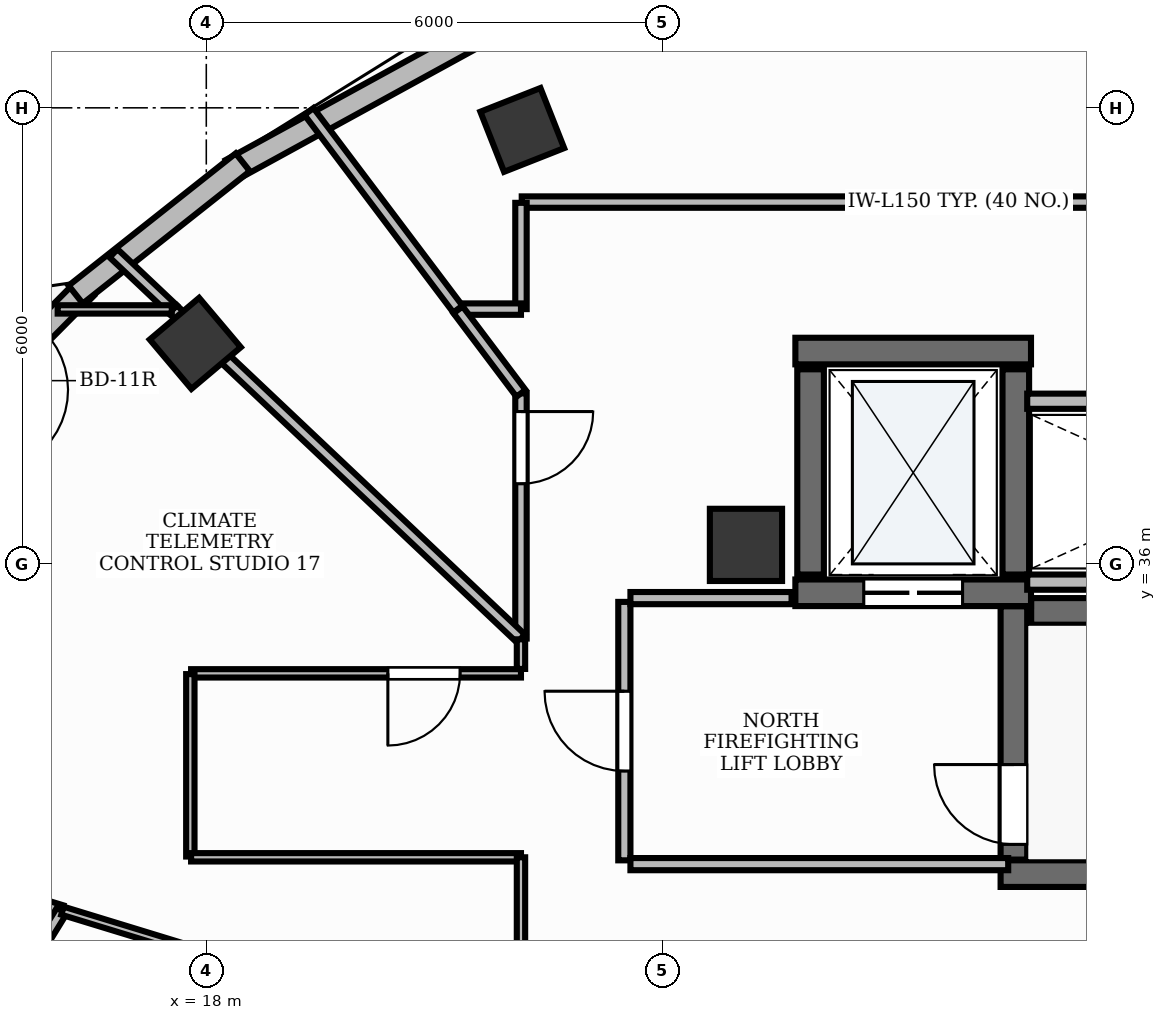
"""IFC4 building model, lengths in metres.
Left out: names, types, materials, properties, quantities, classifications, styles, units other than length and angle.
Written with IfcOpenShell. Run it as: python <this file> out.ifc"""

import sys

from ifc_helpers import new_model, si_unit, direction, frame, frame_2d, origin, origin_2d, place, context, subcontext, project, spatial, rectangle, extrude, element, fill, save


model = new_model("IFC4")
c1 = context("Model", 3, precision=1e-05, world=origin(), true_north=direction((0.0, 1.0)))
c2 = subcontext(c1, "Body", "Model", "MODEL_VIEW")
j1 = project(units=[si_unit("LENGTHUNIT", "METRE"), si_unit("PLANEANGLEUNIT", "RADIAN")], contexts=[c1])
p1 = place(None, origin())
s1 = spatial("IfcSite", under=j1, at=p1, CompositionType="ELEMENT")
p2 = place(p1, origin())
s2 = spatial("IfcBuilding", under=s1, at=p2, CompositionType="ELEMENT")
p3 = place(p2, frame((0.0, 0.0, 291.0)))
s3 = spatial("IfcBuildingStorey", under=s2, at=p3, CompositionType="ELEMENT", Elevation=291.0)
p4 = place(p3, frame((28.852, 35.375, 0.0), z_axis=(0.0, 0.0, 1.0), x_axis=(1.0, 0.0, 0.0)))
e1 = element("IfcWall", 1, at=p4, inside=s3, PredefinedType="SHEAR", context=c2, shape_type="SweptSolid", body=[
    extrude(rectangle(XDim=8.148, YDim=0.35, at=frame_2d((4.074, 0.0))), origin(), (0.0, 0.0, 1.0), 6.3),
])
p5 = place(p3, frame((28.45, 31.925, 0.0), z_axis=(0.0, 0.0, 1.0), x_axis=(1.0, 0.0, 0.0)))
e2 = element("IfcWall", 2, at=p5, inside=s3, PredefinedType="SHEAR", context=c2, shape_type="SweptSolid", body=[
    extrude(rectangle(XDim=8.55, YDim=0.35, at=frame_2d((4.275, 0.0))), origin(), (0.0, 0.0, 1.0), 6.3),
])
p6 = place(p3, frame((28.625, 32.11, 0.0), z_axis=(0.0, 0.0, 1.0), x_axis=(0.0, 1.0, 0.0)))
e3 = element("IfcWall", 3, at=p6, inside=s3, PredefinedType="SHEAR", context=c2, shape_type="SweptSolid", body=[
    extrude(rectangle(XDim=3.333, YDim=0.35, at=frame_2d((1.667, 0.0))), origin(), (0.0, 0.0, 1.0), 6.3),
])
p7 = place(p6, frame((0.2, 0.0, 0.0)))
e4 = element("IfcOpeningElement", 4, at=p7, cuts=e3, PredefinedType="OPENING", context=c2, shape_type="SweptSolid", body=[
    extrude(rectangle(XDim=1.05, YDim=2.15, at=frame_2d((0.525, 1.075))), frame((0.0, 0.19, 0.0), z_axis=(0.0, -1.0, 0.0), x_axis=(1.0, 0.0, 0.0)), (0.0, 0.0, 1.0), 0.38),
])
p8 = place(p3, frame((25.75, 38.8, 0.0), z_axis=(0.0, 0.0, 1.0), x_axis=(1.0, 0.0, 0.0)))
e5 = element("IfcWall", 5, at=p8, inside=s3, PredefinedType="SHEAR", context=c2, shape_type="SweptSolid", body=[
    extrude(rectangle(XDim=3.1, YDim=0.35, at=frame_2d((1.55, 0.0))), origin(), (0.0, 0.0, 1.0), 6.3),
])
p9 = place(p3, frame((25.75, 35.62, 0.0), z_axis=(0.0, 0.0, 1.0), x_axis=(1.0, 0.0, 0.0)))
e6 = element("IfcWall", 6, at=p9, inside=s3, PredefinedType="SHEAR", context=c2, shape_type="SweptSolid", body=[
    extrude(rectangle(XDim=3.1, YDim=0.35, at=frame_2d((1.55, 0.0))), origin(), (0.0, 0.0, 1.0), 6.3),
])
p10 = place(p9, frame((0.9, 0.0, 0.0)))
e7 = element("IfcOpeningElement", 7, at=p10, cuts=e6, PredefinedType="OPENING", context=c2, shape_type="SweptSolid", body=[
    extrude(rectangle(XDim=1.3, YDim=2.2, at=frame_2d((0.65, 1.1))), frame((0.0, 0.19, 0.0), z_axis=(0.0, -1.0, 0.0), x_axis=(1.0, 0.0, 0.0)), (0.0, 0.0, 1.0), 0.38),
])
for number, where, z_axis, x_axis in (
    (8, (25.95, 35.86, 0.0), (0.0, 0.0, 1.0), (0.0, 1.0, 0.0)),
    (9, (28.65, 35.86, 0.0), (0.0, 0.0, 1.0), (0.0, 1.0, 0.0)),
):
    element("IfcWall", number, at=place(p3, frame(where, z_axis=z_axis, x_axis=x_axis)), inside=s3, PredefinedType="SHEAR", context=c2, shape_type="SweptSolid", body=[
        extrude(rectangle(XDim=2.7, YDim=0.35, at=frame_2d((1.35, 0.0))), origin(), (0.0, 0.0, 1.0), 6.3),
    ])
p11 = place(p3, frame((25.1, 36.25, -0.0), z_axis=(0.0, 0.0, 1.0), x_axis=(1.0, 0.0, 0.0)))
e10 = element("IfcColumn", 10, at=p11, inside=s3, PredefinedType="PILASTER", context=c2, shape_type="SweptSolid", body=[
    extrude(rectangle(XDim=0.95, YDim=0.95, at=origin_2d()), origin(), (0.0, 0.0, 1.0), 6.301),
])
for number, where, z_axis, x_axis in (
    (11, (22.157, 41.709, -0.0), (0.0, 0.0, 1.0), (0.93, 0.367, 0.0)),
    (12, (17.855, 38.901, -0.0), (0.0, 0.0, 1.0), (0.764, 0.645, 0.0)),
):
    element("IfcColumn", number, at=place(p3, frame(where, z_axis=z_axis, x_axis=x_axis)), inside=s3, PredefinedType="COLUMN", context=c2, shape_type="SweptSolid", body=[
        extrude(rectangle(XDim=0.85, YDim=0.85, at=origin_2d()), origin(), (0.0, 0.0, 1.0), 6.301),
    ])
p12 = place(p3, frame((16.414, 39.633, 0.0), z_axis=(0.0, 0.0, 1.0), x_axis=(-0.703783131399, -0.710414881572, 0.0)))
e13 = element("IfcWall", 13, at=p12, inside=s3, PredefinedType="STANDARD", context=c2, shape_type="SweptSolid", body=[
    extrude(rectangle(XDim=2.688, YDim=0.3, at=frame_2d((1.344, 0.0))), origin(), (0.0, 0.0, 1.0), 6.3),
])
p13 = place(p12, frame((0.794, 0.0, 0.0)))
e14 = element("IfcOpeningElement", 14, at=p13, cuts=e13, PredefinedType="OPENING", context=c2, shape_type="SweptSolid", body=[
    extrude(rectangle(XDim=1.1, YDim=2.15, at=frame_2d((0.55, 1.075))), frame((0.0, 0.165, 0.0), z_axis=(0.0, -1.0, 0.0), x_axis=(1.0, 0.0, 0.0)), (0.0, 0.0, 1.0), 0.33),
])
p14 = place(p3, frame((23.286, 43.898, 0.0), z_axis=(0.0, 0.0, 1.0), x_axis=(-0.877062479499, -0.480376318166, 0.0)))
e15 = element("IfcWall", 15, at=p14, inside=s3, PredefinedType="STANDARD", context=c2, shape_type="SweptSolid", body=[
    extrude(rectangle(XDim=5.654, YDim=0.3, at=frame_2d((2.827, 0.0))), origin(), (0.0, 0.0, 1.0), 5.87),
])
p15 = place(p3, frame((18.48, 41.283, 0.0), z_axis=(0.0, 0.0, 1.0), x_axis=(-0.784028163495, -0.620725252303, 0.0)))
e16 = element("IfcWall", 16, at=p15, inside=s3, PredefinedType="STANDARD", context=c2, shape_type="SweptSolid", body=[
    extrude(rectangle(XDim=2.803, YDim=0.3, at=frame_2d((1.402, 0.0))), origin(), (0.0, 0.0, 1.0), 5.87),
])
for number, where, z_axis, x_axis in (
    (17, (28.8, 35.76, 0.0), (0.0, 0.0, 1.0), (1.0, 0.0, 0.0)),
    (18, (28.8, 38.14, 0.0), (0.0, 0.0, 1.0), (1.0, 0.0, 0.0)),
):
    element("IfcWall", number, at=place(p3, frame(where, z_axis=z_axis, x_axis=x_axis)), inside=s3, PredefinedType="PARTITIONING", context=c2, shape_type="SweptSolid", body=[
        extrude(rectangle(XDim=4.57, YDim=0.2, at=frame_2d((2.285, 0.0))), origin(), (0.0, 0.0, 1.0), 4.61),
    ])
p16 = place(p3, frame((23.5, 32.1, 0.0), z_axis=(0.0, 0.0, 1.0), x_axis=(0.0, 1.0, 0.0)))
e19 = element("IfcWall", 19, at=p16, inside=s3, PredefinedType="PARTITIONING", context=c2, shape_type="SweptSolid", body=[
    extrude(rectangle(XDim=3.4, YDim=0.16, at=frame_2d((1.7, 0.0))), origin(), (0.0, 0.0, 1.0), 4.61),
])
p17 = place(p16, frame((1.175, 0.0, 0.0)))
e20 = element("IfcOpeningElement", 20, at=p17, cuts=e19, PredefinedType="OPENING", context=c2, shape_type="SweptSolid", body=[
    extrude(rectangle(XDim=1.05, YDim=2.15, at=frame_2d((0.525, 1.075))), frame((0.0, 0.095, 0.0), z_axis=(0.0, -1.0, 0.0), x_axis=(1.0, 0.0, 0.0)), (0.0, 0.0, 1.0), 0.19),
])
p18 = place(p3, frame((23.58, 32.05, 0.0), z_axis=(0.0, 0.0, 1.0), x_axis=(1.0, 0.0, 0.0)))
e21 = element("IfcWall", 21, at=p18, inside=s3, PredefinedType="PARTITIONING", context=c2, shape_type="SweptSolid", body=[
    extrude(rectangle(XDim=4.97, YDim=0.16, at=frame_2d((2.485, 0.0))), origin(), (0.0, 0.0, 1.0), 4.61),
])
p19 = place(p3, frame((23.58, 35.55, 0.0), z_axis=(0.0, 0.0, 1.0), x_axis=(1.0, 0.0, 0.0)))
e22 = element("IfcWall", 22, at=p19, inside=s3, PredefinedType="PARTITIONING", context=c2, shape_type="SweptSolid", body=[
    extrude(rectangle(XDim=2.12, YDim=0.16, at=frame_2d((1.06, 0.0))), origin(), (0.0, 0.0, 1.0), 4.61),
])
p20 = place(p3, frame((35.058, 40.76, 0.0), z_axis=(0.0, 0.0, 1.0), x_axis=(-1.0, 0.0, 0.0)))
e23 = element("IfcWall", 23, at=p20, inside=s3, PredefinedType="PARTITIONING", context=c2, shape_type="SweptSolid", body=[
    extrude(rectangle(XDim=12.908, YDim=0.15, at=frame_2d((6.454, 0.0))), origin(), (0.0, 0.0, 1.0), 4.61),
])
p21 = place(p20, frame((0.24, 0.0, 0.0)))
e24 = element("IfcOpeningElement", 24, at=p21, cuts=e23, PredefinedType="OPENING", context=c2, shape_type="SweptSolid", body=[
    extrude(rectangle(XDim=0.95, YDim=2.15, at=frame_2d((0.475, 1.075))), frame((0.0, 0.09, 0.0), z_axis=(0.0, -1.0, 0.0), x_axis=(1.0, 0.0, 0.0)), (0.0, 0.0, 1.0), 0.18),
])
p22 = place(p3, frame((22.14, 38.244, 0.0), z_axis=(0.0, 0.0, 1.0), x_axis=(0.0, -1.0, 0.0)))
e25 = element("IfcWall", 25, at=p22, inside=s3, PredefinedType="PARTITIONING", context=c2, shape_type="SweptSolid", body=[
    extrude(rectangle(XDim=3.226, YDim=0.15, at=frame_2d((1.613, 0.0))), origin(), (0.0, 0.0, 1.0), 4.61),
])
p23 = place(p22, frame((0.24, 0.0, 0.0)))
e26 = element("IfcOpeningElement", 26, at=p23, cuts=e25, PredefinedType="OPENING", context=c2, shape_type="SweptSolid", body=[
    extrude(rectangle(XDim=0.95, YDim=2.15, at=frame_2d((0.475, 1.075))), frame((0.0, 0.09, 0.0), z_axis=(0.0, -1.0, 0.0), x_axis=(1.0, 0.0, 0.0)), (0.0, 0.0, 1.0), 0.18),
])
p24 = place(p3, frame((22.14, 34.56, 0.0), z_axis=(0.0, 0.0, 1.0), x_axis=(-1.0, 0.0, 0.0)))
e27 = element("IfcWall", 27, at=p24, inside=s3, PredefinedType="MOVABLE", context=c2, shape_type="SweptSolid", body=[
    extrude(rectangle(XDim=4.34, YDim=0.11, at=frame_2d((2.17, 0.0))), origin(), (0.0, 0.0, 1.0), 4.61),
])
p25 = place(p24, frame((0.801, 0.0, 0.0)))
e28 = element("IfcOpeningElement", 28, at=p25, cuts=e27, PredefinedType="OPENING", context=c2, shape_type="SweptSolid", body=[
    extrude(rectangle(XDim=0.95, YDim=2.15, at=frame_2d((0.475, 1.075))), frame((0.0, 0.07, 0.0), z_axis=(0.0, -1.0, 0.0), x_axis=(1.0, 0.0, 0.0)), (0.0, 0.0, 1.0), 0.14),
])
p26 = place(p3, frame((11.395, 32.874, 0.0), z_axis=(0.0, 0.0, 1.0), x_axis=(0.956304539226, -0.292372413638, 0.0)))
e29 = element("IfcWall", 29, at=p26, inside=s3, PredefinedType="PARTITIONING", context=c2, shape_type="SweptSolid", body=[
    extrude(rectangle(XDim=4.917, YDim=0.15, at=frame_2d((2.459, 0.0))), origin(), (0.0, 0.0, 1.0), 4.61),
])
p27 = place(p3, frame((16.098, 31.436, 0.0), z_axis=(0.0, 0.0, 1.0), x_axis=(-0.52427238129, -0.851550626925, 0.0)))
e30 = element("IfcWall", 30, at=p27, inside=s3, PredefinedType="PARTITIONING", context=c2, shape_type="SweptSolid", body=[
    extrude(rectangle(XDim=1.713, YDim=0.15, at=frame_2d((0.856, 0.0))), origin(), (0.0, 0.0, 1.0), 4.61),
])
p28 = place(p3, frame((22.14, 40.75, 0.0), z_axis=(0.0, 0.0, 1.0), x_axis=(0.0, -1.0, 0.0)))
e31 = element("IfcWall", 31, at=p28, inside=s3, PredefinedType="PARTITIONING", context=c2, shape_type="SweptSolid", body=[
    extrude(rectangle(XDim=1.398, YDim=0.15, at=frame_2d((0.699, 0.0))), origin(), (0.0, 0.0, 1.0), 4.61),
])
p29 = place(p3, frame((22.14, 39.352, 0.0), z_axis=(0.0, 0.0, 1.0), x_axis=(-1.0, 0.0, 0.0)))
e32 = element("IfcWall", 32, at=p29, inside=s3, PredefinedType="PARTITIONING", context=c2, shape_type="SweptSolid", body=[
    extrude(rectangle(XDim=0.83, YDim=0.15, at=frame_2d((0.415, 0.0))), origin(), (0.0, 0.0, 1.0), 4.61),
])
p30 = place(p3, frame((21.31, 39.352, 0.0), z_axis=(0.0, 0.0, 1.0), x_axis=(-0.601810040337, 0.798639264843, 0.0)))
e33 = element("IfcWall", 33, at=p30, inside=s3, PredefinedType="PARTITIONING", context=c2, shape_type="SweptSolid", body=[
    extrude(rectangle(XDim=3.256, YDim=0.15, at=frame_2d((1.628, 0.0))), origin(), (0.0, 0.0, 1.0), 4.61),
])
p31 = place(p3, frame((21.312, 39.342, 0.0), z_axis=(0.0, 0.0, 1.0), x_axis=(0.601759967569, -0.79867699443, 0.0)))
e34 = element("IfcWall", 34, at=p31, inside=s3, PredefinedType="PARTITIONING", context=c2, shape_type="SweptSolid", body=[
    extrude(rectangle(XDim=1.375, YDim=0.15, at=frame_2d((0.688, 0.0))), origin(), (0.0, 0.0, 1.0), 4.61),
])
p32 = place(p3, frame((22.14, 35.018, 0.0), z_axis=(0.0, 0.0, 1.0), x_axis=(-0.726568240796, 0.68709431046, 0.0)))
e35 = element("IfcWall", 35, at=p32, inside=s3, PredefinedType="PARTITIONING", context=c2, shape_type="SweptSolid", body=[
    extrude(rectangle(XDim=6.302, YDim=0.15, at=frame_2d((3.151, 0.0))), origin(), (0.0, 0.0, 1.0), 4.61),
])
p33 = place(p3, frame((17.556, 39.352, 0.0), z_axis=(0.0, 0.0, 1.0), x_axis=(-0.726468416955, 0.687199853876, 0.0)))
e36 = element("IfcWall", 36, at=p33, inside=s3, PredefinedType="PARTITIONING", context=c2, shape_type="SweptSolid", body=[
    extrude(rectangle(XDim=1.069, YDim=0.15, at=frame_2d((0.535, 0.0))), origin(), (0.0, 0.0, 1.0), 4.61),
])
p34 = place(p3, frame((16.045, 39.348, 0.0), z_axis=(0.0, 0.0, 1.0), x_axis=(1.0, 0.0, 0.0)))
e37 = element("IfcWall", 37, at=p34, inside=s3, PredefinedType="MOVABLE", context=c2, shape_type="SweptSolid", body=[
    extrude(rectangle(XDim=1.501, YDim=0.11, at=frame_2d((0.751, 0.0))), origin(), (0.0, 0.0, 1.0), 4.61),
])
p35 = place(p3, frame((22.14, 35.008, 0.0), z_axis=(0.0, 0.0, 1.0), x_axis=(0.0, -1.0, 0.0)))
e38 = element("IfcWall", 38, at=p35, inside=s3, PredefinedType="MOVABLE", context=c2, shape_type="SweptSolid", body=[
    extrude(rectangle(XDim=0.39, YDim=0.11, at=frame_2d((0.195, 0.0))), origin(), (0.0, 0.0, 1.0), 4.61),
])
p36 = place(p3, frame((17.79, 34.55, 0.0), z_axis=(0.0, 0.0, 1.0), x_axis=(0.0, -1.0, 0.0)))
e39 = element("IfcWall", 39, at=p36, inside=s3, PredefinedType="MOVABLE", context=c2, shape_type="SweptSolid", body=[
    extrude(rectangle(XDim=2.4, YDim=0.11, at=frame_2d((1.2, 0.0))), origin(), (0.0, 0.0, 1.0), 4.61),
])
p37 = place(p3, frame((17.8, 32.14, 0.0), z_axis=(0.0, 0.0, 1.0), x_axis=(1.0, 0.0, 0.0)))
e40 = element("IfcWall", 40, at=p37, inside=s3, PredefinedType="MOVABLE", context=c2, shape_type="SweptSolid", body=[
    extrude(rectangle(XDim=4.34, YDim=0.11, at=frame_2d((2.17, 0.0))), origin(), (0.0, 0.0, 1.0), 4.61),
])
p38 = place(p3, frame((22.14, 32.14, 0.0), z_axis=(0.0, 0.0, 1.0), x_axis=(0.0, -1.0, 0.0)))
e41 = element("IfcWall", 41, at=p38, inside=s3, PredefinedType="MOVABLE", context=c2, shape_type="SweptSolid", body=[
    extrude(rectangle(XDim=2.547, YDim=0.11, at=frame_2d((1.273, 0.0))), origin(), (0.0, 0.0, 1.0), 4.61),
])
p39 = place(p3, frame((21.955, 29.65, 0.0), z_axis=(0.0, 0.0, 1.0), x_axis=(-0.956300718174, 0.292384911411, 0.0)))
e42 = element("IfcWall", 42, at=p39, inside=s3, PredefinedType="MOVABLE", context=c2, shape_type="SweptSolid", body=[
    extrude(rectangle(XDim=6.114, YDim=0.11, at=frame_2d((3.057, 0.0))), origin(), (0.0, 0.0, 1.0), 4.61),
])
p40 = place(p7, origin())
e43 = element("IfcDoor", 43, at=p40, inside=s3, OperationType="SINGLE_SWING_RIGHT", PredefinedType="DOOR", context=c2, shape_type="SweptSolid", body=[
    extrude(rectangle(XDim=1.05, YDim=2.15, at=frame_2d((0.525, 1.075))), frame((0.0, 0.025, 0.0), z_axis=(0.0, -1.0, 0.0), x_axis=(1.0, 0.0, 0.0)), (0.0, 0.0, 1.0), 0.05),
])
fill(e4, e43)
p41 = place(p10, origin())
e44 = element("IfcDoor", 44, at=p41, inside=s3, OperationType="DOUBLE_DOOR_SLIDING", PredefinedType="DOOR", context=c2, shape_type="SweptSolid", body=[
    extrude(rectangle(XDim=1.3, YDim=2.2, at=frame_2d((0.65, 1.1))), frame((0.0, 0.025, 0.0), z_axis=(0.0, -1.0, 0.0), x_axis=(1.0, 0.0, 0.0)), (0.0, 0.0, 1.0), 0.05),
])
fill(e7, e44)
p42 = place(p17, origin())
e45 = element("IfcDoor", 45, at=p42, inside=s3, OperationType="SINGLE_SWING_RIGHT", PredefinedType="DOOR", context=c2, shape_type="SweptSolid", body=[
    extrude(rectangle(XDim=1.05, YDim=2.15, at=frame_2d((0.525, 1.075))), frame((0.0, 0.025, 0.0), z_axis=(0.0, -1.0, 0.0), x_axis=(1.0, 0.0, 0.0)), (0.0, 0.0, 1.0), 0.05),
])
fill(e20, e45)
p43 = place(p23, origin())
e46 = element("IfcDoor", 46, at=p43, inside=s3, OperationType="SINGLE_SWING_LEFT", PredefinedType="DOOR", context=c2, shape_type="SweptSolid", body=[
    extrude(rectangle(XDim=0.95, YDim=2.15, at=frame_2d((0.475, 1.075))), frame((0.0, 0.025, 0.0), z_axis=(0.0, -1.0, 0.0), x_axis=(1.0, 0.0, 0.0)), (0.0, 0.0, 1.0), 0.05),
])
fill(e26, e46)
p44 = place(p25, origin())
e47 = element("IfcDoor", 47, at=p44, inside=s3, OperationType="SINGLE_SWING_RIGHT", PredefinedType="DOOR", context=c2, shape_type="SweptSolid", body=[
    extrude(rectangle(XDim=0.95, YDim=2.15, at=frame_2d((0.475, 1.075))), frame((0.0, 0.025, 0.0), z_axis=(0.0, -1.0, 0.0), x_axis=(1.0, 0.0, 0.0)), (0.0, 0.0, 1.0), 0.05),
])
fill(e28, e47)
save(model, sys.argv[1])
